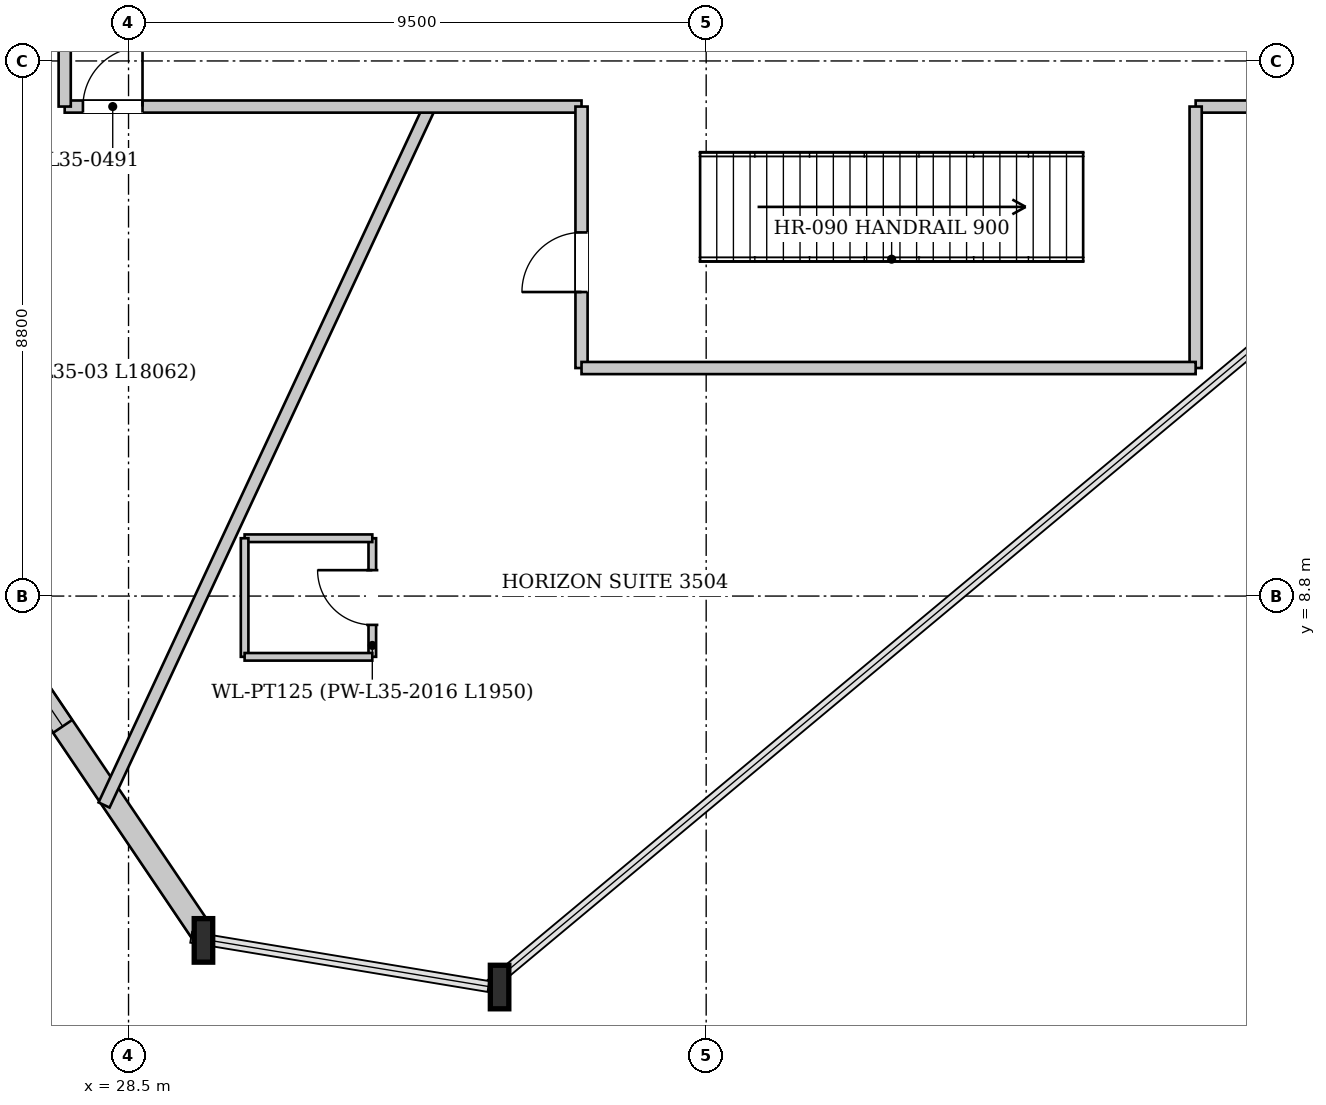
"""IFC4 building model, lengths in metres.
Left out: names, types, materials, properties, quantities, classifications, styles, units other than length and angle.
Written with IfcOpenShell. Run it as: python <this file> out.ifc"""

import sys

from ifc_helpers import new_model, si_unit, direction, frame, frame_2d, origin, origin_2d, place, context, subcontext, project, spatial, rectangle, i_section, extrude, source, transform, mapped, element, fill, save


model = new_model("IFC4")
c1 = context("Model", 3, precision=1e-05, world=origin(), true_north=direction((0.0, 1.0)))
c2 = subcontext(c1, "Body", "Model", "MODEL_VIEW")
j1 = project(units=[si_unit("LENGTHUNIT", "METRE"), si_unit("PLANEANGLEUNIT", "RADIAN")], contexts=[c1])
p1 = place(None, origin())
s1 = spatial("IfcSite", under=j1, at=p1, CompositionType="ELEMENT")
p2 = place(p1, origin())
s2 = spatial("IfcBuilding", under=s1, at=p2, CompositionType="ELEMENT")
p3 = place(p2, frame((0.0, 0.0, 134.1)))
s3 = spatial("IfcBuildingStorey", under=s2, at=p3, CompositionType="ELEMENT", Elevation=134.1)
m1 = source(origin(), c2, "Body", "SweptSolid", [
    extrude(i_section(OverallWidth=0.304, OverallDepth=0.716, WebThickness=0.021, FlangeThickness=0.04, at=origin_2d()), origin(), (0.0, 0.0, 1.0), 3.858),
])
p4 = place(p3, frame((29.53, 3.188, 0.0), z_axis=(0.10480645544, -0.026391480627, 0.994142392542), x_axis=(0.244188687524, 0.969727737504, 0.0)))
e1 = element("IfcColumn", 1, at=p4, inside=s3, PredefinedType="COLUMN", context=c2, shape_type="MappedRepresentation", body=[
    mapped(m1, transform((0.0, 0.0, 0.0), x_axis=(1.0, 0.0, 0.0), y_axis=(0.0, 1.0, 0.0), z_axis=(0.0, 0.0, 1.0), scale=1.0)),
])
m2 = source(origin(), c2, "Body", "SweptSolid", [
    extrude(i_section(OverallWidth=0.304, OverallDepth=0.716, WebThickness=0.021, FlangeThickness=0.04, at=origin_2d()), origin(), (0.0, 0.0, 1.0), 3.852),
])
p5 = place(p3, frame((34.419, 2.379, 0.0), z_axis=(0.094933740142, -0.00449952974, 0.995473424665), x_axis=(0.047343381717, 0.998878673417, 0.0)))
e2 = element("IfcColumn", 2, at=p5, inside=s3, PredefinedType="COLUMN", context=c2, shape_type="MappedRepresentation", body=[
    mapped(m2, transform((0.0, 0.0, 0.0), x_axis=(1.0, 0.0, 0.0), y_axis=(0.0, 1.0, 0.0), z_axis=(0.0, 0.0, 1.0), scale=1.0)),
])
p6 = place(p3, frame((29.688, 3.295, 0.0), z_axis=(0.0, 0.0, 1.0), x_axis=(-0.55956316064, 0.828787710608, 0.0)))
e3 = element("IfcWall", 3, at=p6, inside=s3, PredefinedType="SOLIDWALL", context=c2, shape_type="SweptSolid", body=[
    extrude(rectangle(XDim=18.061, YDim=0.38, at=frame_2d((9.031, 0.0))), origin(), (0.0, 0.0, 1.0), 3.142),
])
p7 = place(p6, frame((4.057, 0.0, 0.222)))
e4 = element("IfcOpeningElement", 4, at=p7, cuts=e3, PredefinedType="OPENING", context=c2, shape_type="SweptSolid", body=[
    extrude(rectangle(XDim=2.0, YDim=2.8, at=frame_2d((1.0, 1.4))), frame((0.0, 0.2, 0.0), z_axis=(0.0, -1.0, 0.0), x_axis=(1.0, 0.0, 0.0)), (0.0, 0.0, 1.0), 0.4),
])
p8 = place(p6, frame((12.004, 0.0, 0.222)))
e5 = element("IfcOpeningElement", 5, at=p8, cuts=e3, PredefinedType="OPENING", context=c2, shape_type="SweptSolid", body=[
    extrude(rectangle(XDim=2.0, YDim=2.8, at=frame_2d((1.0, 1.4))), frame((0.0, 0.2, 0.0), z_axis=(0.0, -1.0, 0.0), x_axis=(1.0, 0.0, 0.0)), (0.0, 0.0, 1.0), 0.4),
])
p9 = place(p3, frame((33.454, 16.85, 0.0), z_axis=(0.0, 0.0, 1.0), x_axis=(-0.42262812914, -0.906303185727, 0.0)))
e6 = element("IfcWall", 6, at=p9, inside=s3, PredefinedType="PARTITIONING", context=c2, shape_type="SweptSolid", body=[
    extrude(rectangle(XDim=12.674, YDim=0.2, at=frame_2d((6.337, 0.0))), origin(), (0.0, 0.0, 1.0), 3.75),
])
p10 = place(p3, frame((32.509, 7.801, 0.0), z_axis=(0.0, 0.0, 1.0), x_axis=(0.0, 1.0, 0.0)))
e7 = element("IfcWall", 7, at=p10, inside=s3, PredefinedType="PARTITIONING", context=c2, shape_type="SweptSolid", body=[
    extrude(rectangle(XDim=1.95, YDim=0.125, at=frame_2d((0.975, 0.0))), origin(), (0.0, 0.0, 1.0), 3.75),
])
p11 = place(p10, frame((0.525, 0.0, 0.0)))
e8 = element("IfcOpeningElement", 8, at=p11, cuts=e7, PredefinedType="OPENING", context=c2, shape_type="SweptSolid", body=[
    extrude(rectangle(XDim=0.9, YDim=2.1, at=frame_2d((0.45, 1.05))), frame((0.0, 0.073, 0.0), z_axis=(0.0, -1.0, 0.0), x_axis=(1.0, 0.0, 0.0)), (0.0, 0.0, 1.0), 0.145),
])
p12 = place(p3, frame((32.509, 9.751, 0.0), z_axis=(0.0, 0.0, 1.0), x_axis=(-1.0, 0.0, 0.0)))
e9 = element("IfcWall", 9, at=p12, inside=s3, PredefinedType="PARTITIONING", context=c2, shape_type="SweptSolid", body=[
    extrude(rectangle(XDim=2.1, YDim=0.125, at=frame_2d((1.05, 0.0))), origin(), (0.0, 0.0, 1.0), 3.75),
])
p13 = place(p3, frame((30.409, 9.751, 0.0), z_axis=(0.0, 0.0, 1.0), x_axis=(0.0, -1.0, 0.0)))
e10 = element("IfcWall", 10, at=p13, inside=s3, PredefinedType="PARTITIONING", context=c2, shape_type="SweptSolid", body=[
    extrude(rectangle(XDim=1.95, YDim=0.125, at=frame_2d((0.975, 0.0))), origin(), (0.0, 0.0, 1.0), 3.75),
])
p14 = place(p3, frame((30.409, 7.801, 0.0), z_axis=(0.0, 0.0, 1.0), x_axis=(1.0, 0.0, 0.0)))
e11 = element("IfcWall", 11, at=p14, inside=s3, PredefinedType="PARTITIONING", context=c2, shape_type="SweptSolid", body=[
    extrude(rectangle(XDim=2.1, YDim=0.125, at=frame_2d((1.05, 0.0))), origin(), (0.0, 0.0, 1.0), 3.75),
])
p15 = place(p3, frame((27.45, 16.85, 0.0), z_axis=(0.0, 0.0, 1.0), x_axis=(1.0, 0.0, 0.0)))
e12 = element("IfcWall", 12, at=p15, inside=s3, PredefinedType="PARTITIONING", context=c2, shape_type="SweptSolid", body=[
    extrude(rectangle(XDim=8.5, YDim=0.2, at=frame_2d((4.25, 0.0))), origin(), (0.0, 0.0, 1.0), 3.75),
])
p16 = place(p15, frame((0.3, 0.0, 0.0)))
e13 = element("IfcOpeningElement", 13, at=p16, cuts=e12, PredefinedType="OPENING", context=c2, shape_type="SweptSolid", body=[
    extrude(rectangle(XDim=0.98, YDim=2.15, at=frame_2d((0.49, 1.075))), frame((0.0, 0.11, 0.0), z_axis=(0.0, -1.0, 0.0), x_axis=(1.0, 0.0, 0.0)), (0.0, 0.0, 1.0), 0.22),
])
p17 = place(p3, frame((46.05, 16.85, 0.0), z_axis=(0.0, 0.0, 1.0), x_axis=(1.0, 0.0, 0.0)))
e14 = element("IfcWall", 14, at=p17, inside=s3, PredefinedType="PARTITIONING", context=c2, shape_type="SweptSolid", body=[
    extrude(rectangle(XDim=2.5, YDim=0.2, at=frame_2d((1.25, 0.0))), origin(), (0.0, 0.0, 1.0), 3.75),
])
p18 = place(p17, frame((1.22, 0.0, 0.0)))
e15 = element("IfcOpeningElement", 15, at=p18, cuts=e14, PredefinedType="OPENING", context=c2, shape_type="SweptSolid", body=[
    extrude(rectangle(XDim=0.98, YDim=2.15, at=frame_2d((0.49, 1.075))), frame((0.0, 0.11, 0.0), z_axis=(0.0, -1.0, 0.0), x_axis=(1.0, 0.0, 0.0)), (0.0, 0.0, 1.0), 0.22),
])
p19 = place(p3, frame((27.45, 16.85, 0.0), z_axis=(0.0, 0.0, 1.0), x_axis=(0.0, 1.0, 0.0)))
e16 = element("IfcWall", 16, at=p19, inside=s3, PredefinedType="PARTITIONING", context=c2, shape_type="SweptSolid", body=[
    extrude(rectangle(XDim=19.5, YDim=0.2, at=frame_2d((9.75, 0.0))), origin(), (0.0, 0.0, 1.0), 3.75),
])
p20 = place(p19, frame((12.66, 0.0, 0.0)))
e17 = element("IfcOpeningElement", 17, at=p20, cuts=e16, PredefinedType="OPENING", context=c2, shape_type="SweptSolid", body=[
    extrude(rectangle(XDim=0.98, YDim=2.15, at=frame_2d((0.49, 1.075))), frame((0.0, 0.11, 0.0), z_axis=(0.0, -1.0, 0.0), x_axis=(1.0, 0.0, 0.0)), (0.0, 0.0, 1.0), 0.22),
])
p21 = place(p3, frame((35.95, 12.55, 0.0), z_axis=(0.0, 0.0, 1.0), x_axis=(0.0, 1.0, 0.0)))
e18 = element("IfcWall", 18, at=p21, inside=s3, PredefinedType="PARTITIONING", context=c2, shape_type="SweptSolid", body=[
    extrude(rectangle(XDim=4.3, YDim=0.2, at=frame_2d((2.15, 0.0))), origin(), (0.0, 0.0, 1.0), 3.245),
])
p22 = place(p21, frame((1.25, 0.0, 0.0)))
e19 = element("IfcOpeningElement", 19, at=p22, cuts=e18, PredefinedType="OPENING", context=c2, shape_type="SweptSolid", body=[
    extrude(rectangle(XDim=0.98, YDim=2.15, at=frame_2d((0.49, 1.075))), frame((0.0, 0.11, 0.0), z_axis=(0.0, -1.0, 0.0), x_axis=(1.0, 0.0, 0.0)), (0.0, 0.0, 1.0), 0.22),
])
p23 = place(p3, frame((46.05, 12.55, 0.0), z_axis=(0.0, 0.0, 1.0), x_axis=(0.0, 1.0, 0.0)))
e20 = element("IfcWall", 20, at=p23, inside=s3, PredefinedType="PARTITIONING", context=c2, shape_type="SweptSolid", body=[
    extrude(rectangle(XDim=4.3, YDim=0.2, at=frame_2d((2.15, 0.0))), origin(), (0.0, 0.0, 1.0), 3.75),
])
p24 = place(p3, frame((35.95, 12.55, 0.0), z_axis=(0.0, 0.0, 1.0), x_axis=(1.0, 0.0, 0.0)))
e21 = element("IfcWall", 21, at=p24, inside=s3, PredefinedType="PARTITIONING", context=c2, shape_type="SweptSolid", body=[
    extrude(rectangle(XDim=10.1, YDim=0.2, at=frame_2d((5.05, 0.0))), origin(), (0.0, 0.0, 1.0), 3.75),
])
m3 = source(origin(), c2, "Body", "SweptSolid", [
    extrude(rectangle(XDim=2.0, YDim=2.8, at=frame_2d((1.0, 1.4))), frame((0.0, 0.03, 0.0), z_axis=(0.0, -1.0, 0.0), x_axis=(1.0, 0.0, 0.0)), (0.0, 0.0, 1.0), 0.06),
])
p25 = place(p7, origin())
e22 = element("IfcWindow", 22, at=p25, inside=s3, PartitioningType="SINGLE_PANEL", PredefinedType="WINDOW", context=c2, shape_type="MappedRepresentation", body=[
    mapped(m3, transform((0.0, 0.0, 0.0), x_axis=(1.0, 0.0, 0.0), y_axis=(0.0, 1.0, 0.0), z_axis=(0.0, 0.0, 1.0), scale=1.0)),
])
fill(e4, e22)
m4 = source(origin(), c2, "Body", "SweptSolid", [
    extrude(rectangle(XDim=0.9, YDim=2.1, at=frame_2d((0.45, 1.05))), frame((0.0, 0.025, 0.0), z_axis=(0.0, -1.0, 0.0), x_axis=(1.0, 0.0, 0.0)), (0.0, 0.0, 1.0), 0.05),
])
p26 = place(p11, origin())
e23 = element("IfcDoor", 23, at=p26, inside=s3, OperationType="SINGLE_SWING_RIGHT", PredefinedType="DOOR", context=c2, shape_type="MappedRepresentation", body=[
    mapped(m4, transform((0.0, 0.0, 0.0), x_axis=(1.0, 0.0, 0.0), y_axis=(0.0, 1.0, 0.0), z_axis=(0.0, 0.0, 1.0), scale=1.0)),
])
fill(e8, e23)
m5 = source(origin(), c2, "Body", "SweptSolid", [
    extrude(rectangle(XDim=0.98, YDim=2.15, at=frame_2d((0.49, 1.075))), frame((0.0, 0.025, 0.0), z_axis=(0.0, -1.0, 0.0), x_axis=(1.0, 0.0, 0.0)), (0.0, 0.0, 1.0), 0.05),
])
p27 = place(p16, origin())
e24 = element("IfcDoor", 24, at=p27, inside=s3, OperationType="SINGLE_SWING_RIGHT", PredefinedType="DOOR", context=c2, shape_type="MappedRepresentation", body=[
    mapped(m5, transform((0.0, 0.0, 0.0), x_axis=(1.0, 0.0, 0.0), y_axis=(0.0, 1.0, 0.0), z_axis=(0.0, 0.0, 1.0), scale=1.0)),
])
fill(e13, e24)
p28 = place(p22, origin())
e25 = element("IfcDoor", 25, at=p28, inside=s3, OperationType="SINGLE_SWING_LEFT", PredefinedType="DOOR", context=c2, shape_type="MappedRepresentation", body=[
    mapped(m5, transform((0.0, 0.0, 0.0), x_axis=(1.0, 0.0, 0.0), y_axis=(0.0, 1.0, 0.0), z_axis=(0.0, 0.0, 1.0), scale=1.0)),
])
fill(e19, e25)
save(model, sys.argv[1])
